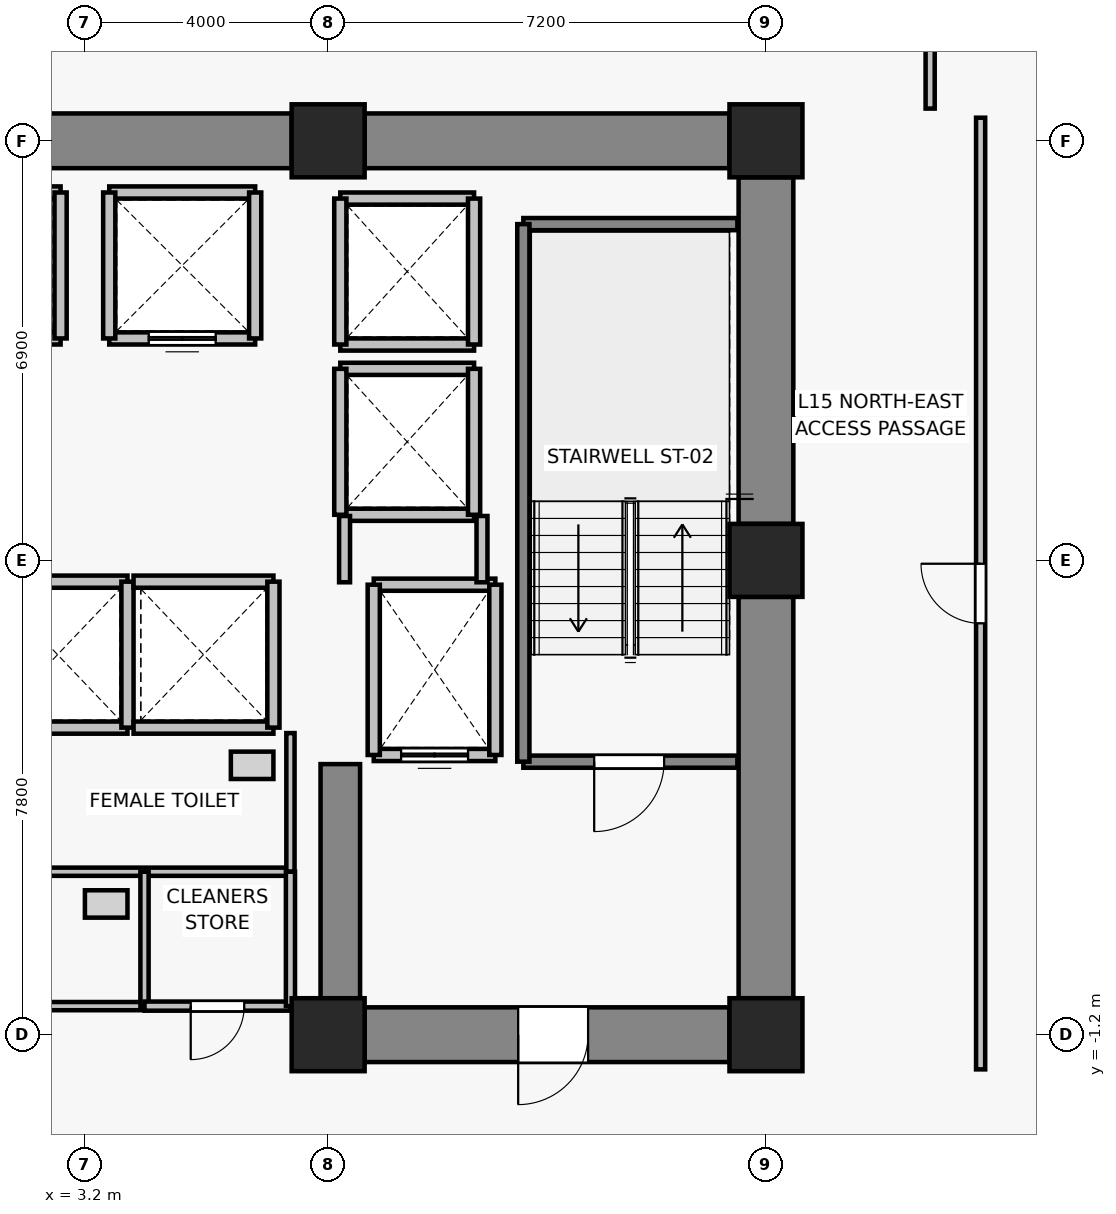
"""IFC4 building model, lengths in metres.
Left out: names, types, materials, properties, quantities, classifications, styles, units other than length and angle.
Written with IfcOpenShell. Run it as: python <this file> out.ifc"""

import sys

from ifc_helpers import new_model, si_unit, direction, frame, frame_2d, origin, origin_2d, place, context, subcontext, project, spatial, rectangle, extrude, source, transform, mapped, element, fill, save


model = new_model("IFC4")
c1 = context("Model", 3, precision=1e-05, world=origin(), true_north=direction((0.0, 1.0)))
c2 = subcontext(c1, "Body", "Model", "MODEL_VIEW")
j1 = project(units=[si_unit("LENGTHUNIT", "METRE"), si_unit("PLANEANGLEUNIT", "RADIAN")], contexts=[c1])
p1 = place(None, origin())
s1 = spatial("IfcSite", under=j1, at=p1, CompositionType="ELEMENT")
p2 = place(p1, origin())
s2 = spatial("IfcBuilding", under=s1, at=p2, CompositionType="ELEMENT")
p3 = place(p2, frame((0.0, 0.0, 57.1)))
s3 = spatial("IfcBuildingStorey", under=s2, at=p3, CompositionType="ELEMENT", Elevation=57.1)
for number, where, z_axis, x_axis in (
    (1, (7.2, -1.2, 0.0), (0.0, 0.0, 1.0), (1.0, 0.0, 0.0)),
    (2, (14.4, -1.2, 0.0), (0.0, 0.0, 1.0), (1.0, 0.0, 0.0)),
    (3, (14.4, 6.6, 0.0), (0.0, 0.0, 1.0), (1.0, 0.0, 0.0)),
    (4, (7.2, 13.5, 0.0), (0.0, 0.0, 1.0), (1.0, 0.0, 0.0)),
    (5, (14.4, 13.5, 0.0), (0.0, 0.0, 1.0), (1.0, 0.0, 0.0)),
):
    element("IfcColumn", number, at=place(p3, frame(where, z_axis=z_axis, x_axis=x_axis)), inside=s3, PredefinedType="COLUMN", context=c2, shape_type="SweptSolid", body=[
        extrude(rectangle(XDim=1.2, YDim=1.2, at=origin_2d()), origin(), (0.0, 0.0, 1.0), 3.3),
    ])
p4 = place(p3, frame((-6.6, 13.5, 0.0), z_axis=(0.0, 0.0, 1.0), x_axis=(1.0, 0.0, 0.0)))
e6 = element("IfcWall", 6, at=p4, inside=s3, PredefinedType="SHEAR", context=c2, shape_type="SweptSolid", body=[
    extrude(rectangle(XDim=13.2, YDim=0.9, at=frame_2d((6.6, 0.0))), origin(), (0.0, 0.0, 1.0), 3.075),
])
p5 = place(p3, frame((7.8, 13.5, 0.0), z_axis=(0.0, 0.0, 1.0), x_axis=(1.0, 0.0, 0.0)))
e7 = element("IfcWall", 7, at=p5, inside=s3, PredefinedType="SHEAR", context=c2, shape_type="SweptSolid", body=[
    extrude(rectangle(XDim=6.0, YDim=0.9, at=frame_2d((3.0, 0.0))), origin(), (0.0, 0.0, 1.0), 3.075),
])
p6 = place(p3, frame((14.4, -0.6, 0.0), z_axis=(0.0, 0.0, 1.0), x_axis=(0.0, 1.0, 0.0)))
e8 = element("IfcWall", 8, at=p6, inside=s3, PredefinedType="SHEAR", context=c2, shape_type="SweptSolid", body=[
    extrude(rectangle(XDim=6.6, YDim=0.9, at=frame_2d((3.3, 0.0))), origin(), (0.0, 0.0, 1.0), 3.075),
])
p7 = place(p3, frame((14.4, 7.2, 0.0), z_axis=(0.0, 0.0, 1.0), x_axis=(0.0, 1.0, 0.0)))
e9 = element("IfcWall", 9, at=p7, inside=s3, PredefinedType="SHEAR", context=c2, shape_type="SweptSolid", body=[
    extrude(rectangle(XDim=5.7, YDim=0.9, at=frame_2d((2.85, 0.0))), origin(), (0.0, 0.0, 1.0), 3.075),
])
p8 = place(p3, frame((13.8, -1.2, 0.0), z_axis=(0.0, 0.0, 1.0), x_axis=(-1.0, 0.0, 0.0)))
e10 = element("IfcWall", 10, at=p8, inside=s3, PredefinedType="SHEAR", context=c2, shape_type="SweptSolid", body=[
    extrude(rectangle(XDim=6.0, YDim=0.9, at=frame_2d((3.0, 0.0))), origin(), (0.0, 0.0, 1.0), 3.075),
])
p9 = place(p8, frame((2.325, 0.0, 0.0)))
e11 = element("IfcOpeningElement", 11, at=p9, cuts=e10, PredefinedType="OPENING", context=c2, shape_type="SweptSolid", body=[
    extrude(rectangle(XDim=1.15, YDim=2.15, at=frame_2d((0.575, 1.075))), frame((0.0, 0.46, 0.0), z_axis=(0.0, -1.0, 0.0), x_axis=(1.0, 0.0, 0.0)), (0.0, 0.0, 1.0), 0.92),
])
p10 = place(p3, frame((7.4, -0.75, 0.0), z_axis=(0.0, 0.0, 1.0), x_axis=(0.0, 1.0, 0.0)))
e12 = element("IfcWall", 12, at=p10, inside=s3, PredefinedType="SHEAR", context=c2, shape_type="SweptSolid", body=[
    extrude(rectangle(XDim=4.0, YDim=0.65, at=frame_2d((2.0, 0.0))), origin(), (0.0, 0.0, 1.0), 3.075),
])
p11 = place(p3, frame((9.95, 3.4, 0.0), z_axis=(0.0, 0.0, 1.0), x_axis=(-1.0, 0.0, 0.0)))
e13 = element("IfcWall", 13, at=p11, inside=s3, PredefinedType="SOLIDWALL", context=c2, shape_type="SweptSolid", body=[
    extrude(rectangle(XDim=2.0, YDim=0.2, at=frame_2d((1.0, 0.0))), origin(), (0.0, 0.0, 1.0), 3.075),
])
p12 = place(p11, frame((0.45, 0.0, 0.0)))
e14 = element("IfcOpeningElement", 14, at=p12, cuts=e13, PredefinedType="OPENING", context=c2, shape_type="SweptSolid", body=[
    extrude(rectangle(XDim=1.1, YDim=2.2, at=frame_2d((0.55, 1.1))), frame((0.0, 0.11, 0.0), z_axis=(0.0, -1.0, 0.0), x_axis=(1.0, 0.0, 0.0)), (0.0, 0.0, 1.0), 0.22),
])
p13 = place(p3, frame((7.95, 6.2, 0.0), z_axis=(0.0, 0.0, 1.0), x_axis=(1.0, 0.0, 0.0)))
e15 = element("IfcWall", 15, at=p13, inside=s3, PredefinedType="SOLIDWALL", context=c2, shape_type="SweptSolid", body=[
    extrude(rectangle(XDim=2.0, YDim=0.2, at=frame_2d((1.0, 0.0))), origin(), (0.0, 0.0, 1.0), 3.075),
])
for number, where, z_axis, x_axis in (
    (16, (7.95, 3.4, 0.0), (0.0, 0.0, 1.0), (0.0, 1.0, 0.0)),
    (17, (9.95, 6.2, 0.0), (0.0, 0.0, 1.0), (0.0, -1.0, 0.0)),
):
    element("IfcWall", number, at=place(p3, frame(where, z_axis=z_axis, x_axis=x_axis)), inside=s3, PredefinedType="SOLIDWALL", context=c2, shape_type="SweptSolid", body=[
        extrude(rectangle(XDim=2.8, YDim=0.2, at=frame_2d((1.4, 0.0))), origin(), (0.0, 0.0, 1.0), 3.075),
    ])
p14 = place(p3, frame((2.8, 10.25, 0.0), z_axis=(0.0, 0.0, 1.0), x_axis=(-1.0, 0.0, 0.0)))
e18 = element("IfcWall", 18, at=p14, inside=s3, PredefinedType="SOLIDWALL", context=c2, shape_type="SweptSolid", body=[
    extrude(rectangle(XDim=2.4, YDim=0.2, at=frame_2d((1.2, 0.0))), origin(), (0.0, 0.0, 1.0), 3.075),
])
p15 = place(p14, frame((0.65, 0.0, 0.0)))
e19 = element("IfcOpeningElement", 19, at=p15, cuts=e18, PredefinedType="OPENING", context=c2, shape_type="SweptSolid", body=[
    extrude(rectangle(XDim=1.1, YDim=2.2, at=frame_2d((0.55, 1.1))), frame((0.0, 0.11, 0.0), z_axis=(0.0, -1.0, 0.0), x_axis=(1.0, 0.0, 0.0)), (0.0, 0.0, 1.0), 0.22),
])
p16 = place(p3, frame((0.4, 12.65, 0.0), z_axis=(0.0, 0.0, 1.0), x_axis=(1.0, 0.0, 0.0)))
e20 = element("IfcWall", 20, at=p16, inside=s3, PredefinedType="SOLIDWALL", context=c2, shape_type="SweptSolid", body=[
    extrude(rectangle(XDim=2.4, YDim=0.2, at=frame_2d((1.2, 0.0))), origin(), (0.0, 0.0, 1.0), 3.075),
])
p17 = place(p3, frame((2.8, 12.65, 0.0), z_axis=(0.0, 0.0, 1.0), x_axis=(0.0, -1.0, 0.0)))
e21 = element("IfcWall", 21, at=p17, inside=s3, PredefinedType="SOLIDWALL", context=c2, shape_type="SweptSolid", body=[
    extrude(rectangle(XDim=2.4, YDim=0.2, at=frame_2d((1.2, 0.0))), origin(), (0.0, 0.0, 1.0), 3.075),
])
p18 = place(p3, frame((6.0, 10.25, 0.0), z_axis=(0.0, 0.0, 1.0), x_axis=(-1.0, 0.0, 0.0)))
e22 = element("IfcWall", 22, at=p18, inside=s3, PredefinedType="SOLIDWALL", context=c2, shape_type="SweptSolid", body=[
    extrude(rectangle(XDim=2.4, YDim=0.2, at=frame_2d((1.2, 0.0))), origin(), (0.0, 0.0, 1.0), 3.075),
])
p19 = place(p18, frame((0.65, 0.0, 0.0)))
e23 = element("IfcOpeningElement", 23, at=p19, cuts=e22, PredefinedType="OPENING", context=c2, shape_type="SweptSolid", body=[
    extrude(rectangle(XDim=1.1, YDim=2.2, at=frame_2d((0.55, 1.1))), frame((0.0, 0.11, 0.0), z_axis=(0.0, -1.0, 0.0), x_axis=(1.0, 0.0, 0.0)), (0.0, 0.0, 1.0), 0.22),
])
for number, where, z_axis, x_axis in (
    (24, (3.6, 12.65, 0.0), (0.0, 0.0, 1.0), (1.0, 0.0, 0.0)),
    (25, (3.6, 10.25, 0.0), (0.0, 0.0, 1.0), (0.0, 1.0, 0.0)),
    (26, (6.0, 12.65, 0.0), (0.0, 0.0, 1.0), (0.0, -1.0, 0.0)),
):
    element("IfcWall", number, at=place(p3, frame(where, z_axis=z_axis, x_axis=x_axis)), inside=s3, PredefinedType="SOLIDWALL", context=c2, shape_type="SweptSolid", body=[
        extrude(rectangle(XDim=2.4, YDim=0.2, at=frame_2d((1.2, 0.0))), origin(), (0.0, 0.0, 1.0), 3.075),
    ])
for number, where, z_axis, x_axis in (
    (27, (3.9, 3.85, 0.0), (0.0, 0.0, 1.0), (-1.0, 0.0, 0.0)),
    (28, (1.6, 6.25, 0.0), (0.0, 0.0, 1.0), (1.0, 0.0, 0.0)),
):
    element("IfcWall", number, at=place(p3, frame(where, z_axis=z_axis, x_axis=x_axis)), inside=s3, PredefinedType="SOLIDWALL", context=c2, shape_type="SweptSolid", body=[
        extrude(rectangle(XDim=2.3, YDim=0.2, at=frame_2d((1.15, 0.0))), origin(), (0.0, 0.0, 1.0), 3.075),
    ])
p20 = place(p3, frame((3.9, 6.25, 0.0), z_axis=(0.0, 0.0, 1.0), x_axis=(0.0, -1.0, 0.0)))
e29 = element("IfcWall", 29, at=p20, inside=s3, PredefinedType="SOLIDWALL", context=c2, shape_type="SweptSolid", body=[
    extrude(rectangle(XDim=2.4, YDim=0.2, at=frame_2d((1.2, 0.0))), origin(), (0.0, 0.0, 1.0), 3.075),
])
for number, where, z_axis, x_axis in (
    (30, (6.3, 3.85, 0.0), (0.0, 0.0, 1.0), (-1.0, 0.0, 0.0)),
    (31, (4.0, 6.25, 0.0), (0.0, 0.0, 1.0), (1.0, 0.0, 0.0)),
):
    element("IfcWall", number, at=place(p3, frame(where, z_axis=z_axis, x_axis=x_axis)), inside=s3, PredefinedType="SOLIDWALL", context=c2, shape_type="SweptSolid", body=[
        extrude(rectangle(XDim=2.3, YDim=0.2, at=frame_2d((1.15, 0.0))), origin(), (0.0, 0.0, 1.0), 3.075),
    ])
p21 = place(p3, frame((6.3, 6.25, 0.0), z_axis=(0.0, 0.0, 1.0), x_axis=(0.0, -1.0, 0.0)))
e32 = element("IfcWall", 32, at=p21, inside=s3, PredefinedType="SOLIDWALL", context=c2, shape_type="SweptSolid", body=[
    extrude(rectangle(XDim=2.4, YDim=0.2, at=frame_2d((1.2, 0.0))), origin(), (0.0, 0.0, 1.0), 3.075),
])
for number, where, z_axis, x_axis in (
    (33, (9.6, 7.35, 0.0), (0.0, 0.0, 1.0), (-1.0, 0.0, 0.0)),
    (34, (7.4, 9.75, 0.0), (0.0, 0.0, 1.0), (1.0, 0.0, 0.0)),
):
    element("IfcWall", number, at=place(p3, frame(where, z_axis=z_axis, x_axis=x_axis)), inside=s3, PredefinedType="SOLIDWALL", context=c2, shape_type="SweptSolid", body=[
        extrude(rectangle(XDim=2.2, YDim=0.2, at=frame_2d((1.1, 0.0))), origin(), (0.0, 0.0, 1.0), 2.465),
    ])
p22 = place(p3, frame((7.4, 7.35, 0.0), z_axis=(0.0, 0.0, 1.0), x_axis=(0.0, 1.0, 0.0)))
e35 = element("IfcWall", 35, at=p22, inside=s3, PredefinedType="SOLIDWALL", context=c2, shape_type="SweptSolid", body=[
    extrude(rectangle(XDim=2.4, YDim=0.2, at=frame_2d((1.2, 0.0))), origin(), (0.0, 0.0, 1.0), 2.465),
])
p23 = place(p3, frame((9.6, 9.75, 0.0), z_axis=(0.0, 0.0, 1.0), x_axis=(0.0, -1.0, 0.0)))
e36 = element("IfcWall", 36, at=p23, inside=s3, PredefinedType="SOLIDWALL", context=c2, shape_type="SweptSolid", body=[
    extrude(rectangle(XDim=2.4, YDim=0.2, at=frame_2d((1.2, 0.0))), origin(), (0.0, 0.0, 1.0), 3.075),
])
for number, where, z_axis, x_axis in (
    (37, (9.6, 10.15, 0.0), (0.0, 0.0, 1.0), (-1.0, 0.0, 0.0)),
    (38, (7.4, 12.55, 0.0), (0.0, 0.0, 1.0), (1.0, 0.0, 0.0)),
):
    element("IfcWall", number, at=place(p3, frame(where, z_axis=z_axis, x_axis=x_axis)), inside=s3, PredefinedType="SOLIDWALL", context=c2, shape_type="SweptSolid", body=[
        extrude(rectangle(XDim=2.2, YDim=0.2, at=frame_2d((1.1, 0.0))), origin(), (0.0, 0.0, 1.0), 2.465),
    ])
p24 = place(p3, frame((7.4, 10.15, 0.0), z_axis=(0.0, 0.0, 1.0), x_axis=(0.0, 1.0, 0.0)))
e39 = element("IfcWall", 39, at=p24, inside=s3, PredefinedType="SOLIDWALL", context=c2, shape_type="SweptSolid", body=[
    extrude(rectangle(XDim=2.4, YDim=0.2, at=frame_2d((1.2, 0.0))), origin(), (0.0, 0.0, 1.0), 2.465),
])
p25 = place(p3, frame((9.6, 12.55, 0.0), z_axis=(0.0, 0.0, 1.0), x_axis=(0.0, -1.0, 0.0)))
e40 = element("IfcWall", 40, at=p25, inside=s3, PredefinedType="SOLIDWALL", context=c2, shape_type="SweptSolid", body=[
    extrude(rectangle(XDim=2.4, YDim=0.2, at=frame_2d((1.2, 0.0))), origin(), (0.0, 0.0, 1.0), 3.075),
])
p26 = place(p3, frame((13.93, 3.29, 0.0), z_axis=(0.0, 0.0, 1.0), x_axis=(-1.0, 0.0, 0.0)))
e41 = element("IfcWall", 41, at=p26, inside=s3, PredefinedType="SOLIDWALL", context=c2, shape_type="SweptSolid", body=[
    extrude(rectangle(XDim=3.52, YDim=0.2, at=frame_2d((1.76, 0.0))), origin(), (0.0, 0.0, 1.0), 3.075),
])
p27 = place(p26, frame((1.205, 0.0, 0.0)))
e42 = element("IfcOpeningElement", 42, at=p27, cuts=e41, PredefinedType="OPENING", context=c2, shape_type="SweptSolid", body=[
    extrude(rectangle(XDim=1.15, YDim=2.15, at=frame_2d((0.575, 1.075))), frame((0.0, 0.11, 0.0), z_axis=(0.0, -1.0, 0.0), x_axis=(1.0, 0.0, 0.0)), (0.0, 0.0, 1.0), 0.22),
])
p28 = place(p3, frame((10.41, 12.13, 0.0), z_axis=(0.0, 0.0, 1.0), x_axis=(1.0, 0.0, 0.0)))
e43 = element("IfcWall", 43, at=p28, inside=s3, PredefinedType="SOLIDWALL", context=c2, shape_type="SweptSolid", body=[
    extrude(rectangle(XDim=3.52, YDim=0.2, at=frame_2d((1.76, 0.0))), origin(), (0.0, 0.0, 1.0), 3.075),
])
p29 = place(p3, frame((10.41, 3.29, 0.0), z_axis=(0.0, 0.0, 1.0), x_axis=(0.0, 1.0, 0.0)))
e44 = element("IfcWall", 44, at=p29, inside=s3, PredefinedType="SOLIDWALL", context=c2, shape_type="SweptSolid", body=[
    extrude(rectangle(XDim=8.84, YDim=0.2, at=frame_2d((4.42, 0.0))), origin(), (0.0, 0.0, 1.0), 3.075),
])
p30 = place(p3, frame((7.47, 6.24, 0.0), z_axis=(0.0, 0.0, 1.0), x_axis=(0.0, 1.0, 0.0)))
e45 = element("IfcWall", 45, at=p30, inside=s3, PredefinedType="PARTITIONING", context=c2, shape_type="SweptSolid", body=[
    extrude(rectangle(XDim=1.09, YDim=0.18, at=frame_2d((0.545, 0.0))), origin(), (0.0, 0.0, 1.0), 2.465),
])
p31 = place(p3, frame((9.73, 7.33, 0.0), z_axis=(0.0, 0.0, 1.0), x_axis=(0.0, -1.0, 0.0)))
e46 = element("IfcWall", 46, at=p31, inside=s3, PredefinedType="PARTITIONING", context=c2, shape_type="SweptSolid", body=[
    extrude(rectangle(XDim=1.09, YDim=0.18, at=frame_2d((0.545, 0.0))), origin(), (0.0, 0.0, 1.0), 3.075),
])
p32 = place(p3, frame((6.58, 1.48, 0.0), z_axis=(0.0, 0.0, 1.0), x_axis=(-1.0, 0.0, 0.0)))
e47 = element("IfcWall", 47, at=p32, inside=s3, PredefinedType="PARTITIONING", context=c2, shape_type="SweptSolid", body=[
    extrude(rectangle(XDim=5.11, YDim=0.135, at=frame_2d((2.555, 0.0))), origin(), (0.0, 0.0, 1.0), 3.075),
])
p33 = place(p3, frame((6.58, 3.76, 0.0), z_axis=(0.0, 0.0, 1.0), x_axis=(0.0, -1.0, 0.0)))
e48 = element("IfcWall", 48, at=p33, inside=s3, PredefinedType="PARTITIONING", context=c2, shape_type="SweptSolid", body=[
    extrude(rectangle(XDim=2.28, YDim=0.135, at=frame_2d((1.14, 0.0))), origin(), (0.0, 0.0, 1.0), 3.075),
])
p34 = place(p3, frame((4.18, -0.73, 0.0), z_axis=(0.0, 0.0, 1.0), x_axis=(-1.0, 0.0, 0.0)))
e49 = element("IfcWall", 49, at=p34, inside=s3, PredefinedType="PARTITIONING", context=c2, shape_type="SweptSolid", body=[
    extrude(rectangle(XDim=2.71, YDim=0.135, at=frame_2d((1.355, 0.0))), origin(), (0.0, 0.0, 1.0), 3.075),
])
p35 = place(p3, frame((4.18, 1.48, 0.0), z_axis=(0.0, 0.0, 1.0), x_axis=(0.0, -1.0, 0.0)))
e50 = element("IfcWall", 50, at=p35, inside=s3, PredefinedType="PARTITIONING", context=c2, shape_type="SweptSolid", body=[
    extrude(rectangle(XDim=2.21, YDim=0.135, at=frame_2d((1.105, 0.0))), origin(), (0.0, 0.0, 1.0), 3.075),
])
p36 = place(p3, frame((6.58, -0.73, 0.0), z_axis=(0.0, 0.0, 1.0), x_axis=(-1.0, 0.0, 0.0)))
e51 = element("IfcWall", 51, at=p36, inside=s3, PredefinedType="PARTITIONING", context=c2, shape_type="SweptSolid", body=[
    extrude(rectangle(XDim=2.4, YDim=0.15, at=frame_2d((1.2, 0.0))), origin(), (0.0, 0.0, 1.0), 3.075),
])
p37 = place(p36, frame((0.76, 0.0, 0.0)))
e52 = element("IfcOpeningElement", 52, at=p37, cuts=e51, PredefinedType="OPENING", context=c2, shape_type="SweptSolid", body=[
    extrude(rectangle(XDim=0.88, YDim=2.1, at=frame_2d((0.44, 1.05))), frame((0.0, 0.085, 0.0), z_axis=(0.0, -1.0, 0.0), x_axis=(1.0, 0.0, 0.0)), (0.0, 0.0, 1.0), 0.17),
])
p38 = place(p3, frame((6.58, 1.48, 0.0), z_axis=(0.0, 0.0, 1.0), x_axis=(0.0, -1.0, 0.0)))
e53 = element("IfcWall", 53, at=p38, inside=s3, PredefinedType="PARTITIONING", context=c2, shape_type="SweptSolid", body=[
    extrude(rectangle(XDim=2.21, YDim=0.15, at=frame_2d((1.105, 0.0))), origin(), (0.0, 0.0, 1.0), 3.075),
])
p39 = place(p3, frame((17.93, -1.77, 0.0), z_axis=(0.0, 0.0, 1.0), x_axis=(0.0, 1.0, 0.0)))
e54 = element("IfcWall", 54, at=p39, inside=s3, PredefinedType="PARTITIONING", context=c2, shape_type="SweptSolid", body=[
    extrude(rectangle(XDim=15.65, YDim=0.15, at=frame_2d((7.825, 0.0))), origin(), (0.0, 0.0, 1.0), 2.465),
])
p40 = place(p39, frame((7.335, 0.0, 0.0)))
e55 = element("IfcOpeningElement", 55, at=p40, cuts=e54, PredefinedType="OPENING", context=c2, shape_type="SweptSolid", body=[
    extrude(rectangle(XDim=0.98, YDim=2.15, at=frame_2d((0.49, 1.075))), frame((0.0, 0.085, 0.0), z_axis=(0.0, -1.0, 0.0), x_axis=(1.0, 0.0, 0.0)), (0.0, 0.0, 1.0), 0.17),
])
p41 = place(p3, frame((17.1, 18.13, 0.0), z_axis=(0.0, 0.0, 1.0), x_axis=(0.0, -1.0, 0.0)))
e56 = element("IfcWall", 56, at=p41, inside=s3, PredefinedType="PARTITIONING", context=c2, shape_type="SweptSolid", body=[
    extrude(rectangle(XDim=4.1, YDim=0.15, at=frame_2d((2.05, 0.0))), origin(), (0.0, 0.0, 1.0), 2.465),
])
m1 = source(origin(), c2, "Body", "SweptSolid", [
    extrude(rectangle(XDim=1.1, YDim=2.2, at=frame_2d((0.55, 1.1))), frame((0.0, 0.025, 0.0), z_axis=(0.0, -1.0, 0.0), x_axis=(1.0, 0.0, 0.0)), (0.0, 0.0, 1.0), 0.05),
])
p42 = place(p12, origin())
e57 = element("IfcDoor", 57, at=p42, inside=s3, OperationType="DOUBLE_DOOR_SLIDING", PredefinedType="DOOR", context=c2, shape_type="MappedRepresentation", body=[
    mapped(m1, transform((0.0, 0.0, 0.0), x_axis=(1.0, 0.0, 0.0), y_axis=(0.0, 1.0, 0.0), z_axis=(0.0, 0.0, 1.0), scale=1.0)),
])
fill(e14, e57)
p43 = place(p19, origin())
e58 = element("IfcDoor", 58, at=p43, inside=s3, OperationType="DOUBLE_DOOR_SLIDING", PredefinedType="DOOR", context=c2, shape_type="MappedRepresentation", body=[
    mapped(m1, transform((0.0, 0.0, 0.0), x_axis=(1.0, 0.0, 0.0), y_axis=(0.0, 1.0, 0.0), z_axis=(0.0, 0.0, 1.0), scale=1.0)),
])
fill(e23, e58)
m2 = source(origin(), c2, "Body", "SweptSolid", [
    extrude(rectangle(XDim=1.15, YDim=2.15, at=frame_2d((0.575, 1.075))), frame((0.0, 0.025, 0.0), z_axis=(0.0, -1.0, 0.0), x_axis=(1.0, 0.0, 0.0)), (0.0, 0.0, 1.0), 0.05),
])
p44 = place(p27, origin())
e59 = element("IfcDoor", 59, at=p44, inside=s3, OperationType="SINGLE_SWING_RIGHT", PredefinedType="DOOR", context=c2, shape_type="MappedRepresentation", body=[
    mapped(m2, transform((0.0, 0.0, 0.0), x_axis=(1.0, 0.0, 0.0), y_axis=(0.0, 1.0, 0.0), z_axis=(0.0, 0.0, 1.0), scale=1.0)),
])
fill(e42, e59)
p45 = place(p9, origin())
e60 = element("IfcDoor", 60, at=p45, inside=s3, OperationType="SINGLE_SWING_RIGHT", PredefinedType="DOOR", context=c2, shape_type="MappedRepresentation", body=[
    mapped(m2, transform((0.0, 0.0, 0.0), x_axis=(1.0, 0.0, 0.0), y_axis=(0.0, 1.0, 0.0), z_axis=(0.0, 0.0, 1.0), scale=1.0)),
])
fill(e11, e60)
m3 = source(origin(), c2, "Body", "SweptSolid", [
    extrude(rectangle(XDim=0.88, YDim=2.1, at=frame_2d((0.44, 1.05))), frame((0.0, 0.025, 0.0), z_axis=(0.0, -1.0, 0.0), x_axis=(1.0, 0.0, 0.0)), (0.0, 0.0, 1.0), 0.05),
])
p46 = place(p37, origin())
e61 = element("IfcDoor", 61, at=p46, inside=s3, OperationType="SINGLE_SWING_RIGHT", PredefinedType="DOOR", context=c2, shape_type="MappedRepresentation", body=[
    mapped(m3, transform((0.0, 0.0, 0.0), x_axis=(1.0, 0.0, 0.0), y_axis=(0.0, 1.0, 0.0), z_axis=(0.0, 0.0, 1.0), scale=1.0)),
])
fill(e52, e61)
m4 = source(origin(), c2, "Body", "SweptSolid", [
    extrude(rectangle(XDim=0.98, YDim=2.15, at=frame_2d((0.49, 1.075))), frame((0.0, 0.025, 0.0), z_axis=(0.0, -1.0, 0.0), x_axis=(1.0, 0.0, 0.0)), (0.0, 0.0, 1.0), 0.05),
])
p47 = place(p40, origin())
e62 = element("IfcDoor", 62, at=p47, inside=s3, OperationType="SINGLE_SWING_RIGHT", PredefinedType="DOOR", context=c2, shape_type="MappedRepresentation", body=[
    mapped(m4, transform((0.0, 0.0, 0.0), x_axis=(1.0, 0.0, 0.0), y_axis=(0.0, 1.0, 0.0), z_axis=(0.0, 0.0, 1.0), scale=1.0)),
])
fill(e55, e62)
save(model, sys.argv[1])
